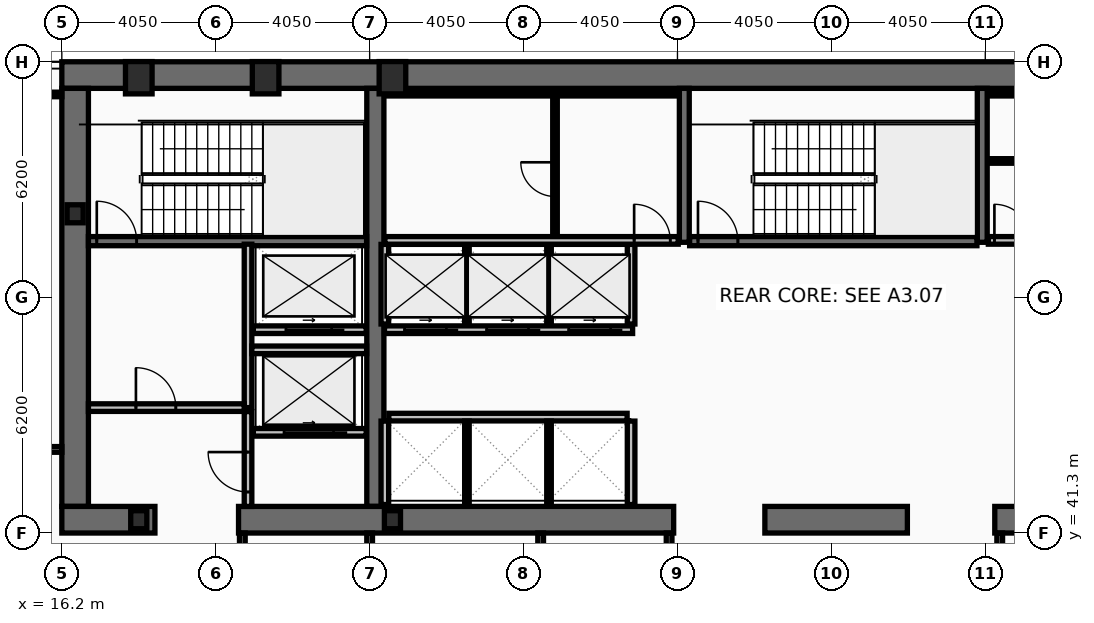
"""IFC4 building model, lengths in metres.
Left out: names, types, materials, properties, quantities, classifications, styles, units other than length and angle.
Written with IfcOpenShell. Run it as: python <this file> out.ifc"""

import sys

from ifc_helpers import new_model, si_unit, direction, frame, frame_2d, origin, origin_2d, place, context, subcontext, project, spatial, rectangle, hollow_rectangle, i_section, extrude, element, fill, save


model = new_model("IFC4")
c1 = context("Model", 3, precision=1e-05, world=origin(), true_north=direction((0.0, 1.0)))
c2 = subcontext(c1, "Body", "Model", "MODEL_VIEW")
j1 = project(units=[si_unit("LENGTHUNIT", "METRE"), si_unit("PLANEANGLEUNIT", "RADIAN")], contexts=[c1])
p1 = place(None, origin())
s1 = spatial("IfcSite", under=j1, at=p1, CompositionType="ELEMENT")
p2 = place(p1, origin())
s2 = spatial("IfcBuilding", under=s1, at=p2, CompositionType="ELEMENT")
p3 = place(p2, frame((0.0, 0.0, 94.6)))
s3 = spatial("IfcBuildingStorey", under=s2, at=p3, CompositionType="ELEMENT", Elevation=94.6)
p4 = place(p3, frame((16.2, 53.35, 0.0), z_axis=(0.0, 0.0, 1.0), x_axis=(1.0, 0.0, 0.0)))
e1 = element("IfcWall", 1, at=p4, inside=s3, PredefinedType="SHEAR", context=c2, shape_type="SweptSolid", body=[
    extrude(rectangle(XDim=40.5, YDim=0.7, at=frame_2d((20.25, 0.0))), origin(), (0.0, 0.0, 1.0), 3.82),
])
p5 = place(p3, frame((16.55, 42.0, 0.0), z_axis=(0.0, 0.0, 1.0), x_axis=(0.0, 1.0, 0.0)))
e2 = element("IfcWall", 2, at=p5, inside=s3, PredefinedType="SHEAR", context=c2, shape_type="SweptSolid", body=[
    extrude(rectangle(XDim=11.0, YDim=0.7, at=frame_2d((5.5, 0.0))), origin(), (0.0, 0.0, 1.0), 3.82),
])
p6 = place(p3, frame((24.45, 42.0, 0.0), z_axis=(0.0, 0.0, 1.0), x_axis=(0.0, 1.0, 0.0)))
e3 = element("IfcWall", 3, at=p6, inside=s3, PredefinedType="SHEAR", context=c2, shape_type="SweptSolid", body=[
    extrude(rectangle(XDim=11.0, YDim=0.45, at=frame_2d((5.5, 0.0))), origin(), (0.0, 0.0, 1.0), 3.82),
])
p7 = place(p3, frame((18.65, 41.65, 0.0), z_axis=(0.0, 0.0, 1.0), x_axis=(-1.0, 0.0, 0.0)))
e4 = element("IfcWall", 4, at=p7, inside=s3, PredefinedType="SHEAR", context=c2, shape_type="SweptSolid", body=[
    extrude(rectangle(XDim=2.45, YDim=0.7, at=frame_2d((1.225, 0.0))), origin(), (0.0, 0.0, 1.0), 3.82),
])
p8 = place(p3, frame((32.3, 41.65, 0.0), z_axis=(0.0, 0.0, 1.0), x_axis=(-1.0, 0.0, 0.0)))
e5 = element("IfcWall", 5, at=p8, inside=s3, PredefinedType="SHEAR", context=c2, shape_type="SweptSolid", body=[
    extrude(rectangle(XDim=11.45, YDim=0.7, at=frame_2d((5.725, 0.0))), origin(), (0.0, 0.0, 1.0), 3.82),
])
p9 = place(p3, frame((38.45, 41.65, 0.0), z_axis=(0.0, 0.0, 1.0), x_axis=(-1.0, 0.0, 0.0)))
e6 = element("IfcWall", 6, at=p9, inside=s3, PredefinedType="SHEAR", context=c2, shape_type="SweptSolid", body=[
    extrude(rectangle(XDim=3.75, YDim=0.7, at=frame_2d((1.875, 0.0))), origin(), (0.0, 0.0, 1.0), 3.82),
])
p10 = place(p3, frame((52.05, 41.65, 0.0), z_axis=(0.0, 0.0, 1.0), x_axis=(-1.0, 0.0, 0.0)))
e7 = element("IfcWall", 7, at=p10, inside=s3, PredefinedType="SHEAR", context=c2, shape_type="SweptSolid", body=[
    extrude(rectangle(XDim=11.3, YDim=0.7, at=frame_2d((5.65, 0.0))), origin(), (0.0, 0.0, 1.0), 3.82),
])
for number, where, z_axis, x_axis in (
    (8, (32.58, 48.95, 0.0), (0.0, 0.0, 1.0), (0.0, 1.0, 0.0)),
    (9, (40.42, 48.95, 0.0), (0.0, 0.0, 1.0), (0.0, 1.0, 0.0)),
):
    element("IfcWall", number, at=place(p3, frame(where, z_axis=z_axis, x_axis=x_axis)), inside=s3, PredefinedType="SHEAR", context=c2, shape_type="SweptSolid", body=[
        extrude(rectangle(XDim=4.05, YDim=0.26, at=frame_2d((2.025, 0.0))), origin(), (0.0, 0.0, 1.0), 3.82),
    ])
p11 = place(p3, frame((16.9, 48.98, 0.0), z_axis=(0.0, 0.0, 1.0), x_axis=(1.0, 0.0, 0.0)))
e10 = element("IfcWall", 10, at=p11, inside=s3, PredefinedType="SHEAR", context=c2, shape_type="SweptSolid", body=[
    extrude(rectangle(XDim=7.32, YDim=0.24, at=frame_2d((3.66, 0.0))), origin(), (0.0, 0.0, 1.0), 3.82),
])
p12 = place(p11, frame((0.22, 0.0, 0.0)))
e11 = element("IfcOpeningElement", 11, at=p12, cuts=e10, PredefinedType="OPENING", context=c2, shape_type="SweptSolid", body=[
    extrude(rectangle(XDim=1.05, YDim=2.15, at=frame_2d((0.525, 1.075))), frame((0.0, 0.13, 0.0), z_axis=(0.0, -1.0, 0.0), x_axis=(1.0, 0.0, 0.0)), (0.0, 0.0, 1.0), 0.26),
])
p13 = place(p3, frame((32.72, 48.98, 0.0), z_axis=(0.0, 0.0, 1.0), x_axis=(1.0, 0.0, 0.0)))
e12 = element("IfcWall", 12, at=p13, inside=s3, PredefinedType="SHEAR", context=c2, shape_type="SweptSolid", body=[
    extrude(rectangle(XDim=7.56, YDim=0.24, at=frame_2d((3.78, 0.0))), origin(), (0.0, 0.0, 1.0), 3.82),
])
p14 = place(p13, frame((0.22, 0.0, 0.0)))
e13 = element("IfcOpeningElement", 13, at=p14, cuts=e12, PredefinedType="OPENING", context=c2, shape_type="SweptSolid", body=[
    extrude(rectangle(XDim=1.05, YDim=2.15, at=frame_2d((0.525, 1.075))), frame((0.0, 0.13, 0.0), z_axis=(0.0, -1.0, 0.0), x_axis=(1.0, 0.0, 0.0)), (0.0, 0.0, 1.0), 0.26),
])
for number, where, z_axis, x_axis in (
    (14, (18.225, 53.28, 0.0), (0.0, 0.0, 1.0), (1.0, 0.0, 0.0)),
    (15, (21.562, 53.28, 0.0), (0.0, 0.0, 1.0), (1.0, 0.0, 0.0)),
    (16, (24.9, 53.28, 0.0), (0.0, 0.0, 1.0), (1.0, 0.0, 0.0)),
):
    element("IfcColumn", number, at=place(p3, frame(where, z_axis=z_axis, x_axis=x_axis)), inside=s3, PredefinedType="COLUMN", context=c2, shape_type="SweptSolid", body=[
        extrude(hollow_rectangle(XDim=0.7, YDim=0.85, WallThickness=0.05, at=origin_2d()), origin(), (0.0, 0.0, 1.0), 4.0),
    ])
for number, where, z_axis, x_axis in (
    (17, (16.55, 49.7, 0.0), (0.0, 0.0, 1.0), (1.0, 0.0, 0.0)),
    (18, (18.225, 41.65, 0.0), (0.0, 0.0, 1.0), (1.0, 0.0, 0.0)),
    (19, (24.9, 41.65, 0.0), (0.0, 0.0, 1.0), (1.0, 0.0, 0.0)),
):
    element("IfcColumn", number, at=place(p3, frame(where, z_axis=z_axis, x_axis=x_axis)), inside=s3, PredefinedType="COLUMN", context=c2, shape_type="SweptSolid", body=[
        extrude(i_section(OverallWidth=0.424, OverallDepth=0.474, WebThickness=0.048, FlangeThickness=0.077, at=origin_2d()), origin(), (0.0, 0.0, 1.0), 4.0),
    ])
p15 = place(p3, frame((24.21, 43.95, 0.0), z_axis=(0.0, 0.0, 1.0), x_axis=(-1.0, 0.0, 0.0)))
e20 = element("IfcWall", 20, at=p15, inside=s3, PredefinedType="PARTITIONING", context=c2, shape_type="SweptSolid", body=[
    extrude(rectangle(XDim=2.97, YDim=0.2, at=frame_2d((1.485, 0.0))), origin(), (0.0, 0.0, 1.0), 3.82),
])
p16 = place(p15, frame((0.86, 0.0, 0.0)))
e21 = element("IfcOpeningElement", 21, at=p16, cuts=e20, PredefinedType="OPENING", context=c2, shape_type="SweptSolid", body=[
    extrude(rectangle(XDim=1.3, YDim=2.18, at=frame_2d((0.65, 1.09))), frame((0.0, 0.11, 0.0), z_axis=(0.0, -1.0, 0.0), x_axis=(1.0, 0.0, 0.0)), (0.0, 0.0, 1.0), 0.22),
])
p17 = place(p3, frame((24.21, 46.65, 0.0), z_axis=(0.0, 0.0, 1.0), x_axis=(-1.0, 0.0, 0.0)))
e22 = element("IfcWall", 22, at=p17, inside=s3, PredefinedType="PARTITIONING", context=c2, shape_type="SweptSolid", body=[
    extrude(rectangle(XDim=2.97, YDim=0.2, at=frame_2d((1.485, 0.0))), origin(), (0.0, 0.0, 1.0), 3.82),
])
p18 = place(p17, frame((0.91, 0.0, 0.0)))
e23 = element("IfcOpeningElement", 23, at=p18, cuts=e22, PredefinedType="OPENING", context=c2, shape_type="SweptSolid", body=[
    extrude(rectangle(XDim=1.2, YDim=2.18, at=frame_2d((0.6, 1.09))), frame((0.0, 0.11, 0.0), z_axis=(0.0, -1.0, 0.0), x_axis=(1.0, 0.0, 0.0)), (0.0, 0.0, 1.0), 0.22),
])
p19 = place(p3, frame((31.22, 46.65, 0.0), z_axis=(0.0, 0.0, 1.0), x_axis=(-1.0, 0.0, 0.0)))
e24 = element("IfcWall", 24, at=p19, inside=s3, PredefinedType="PARTITIONING", context=c2, shape_type="SweptSolid", body=[
    extrude(rectangle(XDim=6.53, YDim=0.2, at=frame_2d((3.265, 0.0))), origin(), (0.0, 0.0, 1.0), 3.82),
])
p20 = place(p19, frame((4.9, 0.0, 0.0)))
e25 = element("IfcOpeningElement", 25, at=p20, cuts=e24, PredefinedType="OPENING", context=c2, shape_type="SweptSolid", body=[
    extrude(rectangle(XDim=1.1, YDim=2.18, at=frame_2d((0.55, 1.09))), frame((0.0, 0.11, 0.0), z_axis=(0.0, -1.0, 0.0), x_axis=(1.0, 0.0, 0.0)), (0.0, 0.0, 1.0), 0.22),
])
p21 = place(p19, frame((2.74, 0.0, 0.0)))
e26 = element("IfcOpeningElement", 26, at=p21, cuts=e24, PredefinedType="OPENING", context=c2, shape_type="SweptSolid", body=[
    extrude(rectangle(XDim=1.1, YDim=2.18, at=frame_2d((0.55, 1.09))), frame((0.0, 0.11, 0.0), z_axis=(0.0, -1.0, 0.0), x_axis=(1.0, 0.0, 0.0)), (0.0, 0.0, 1.0), 0.22),
])
p22 = place(p19, frame((0.58, 0.0, 0.0)))
e27 = element("IfcOpeningElement", 27, at=p22, cuts=e24, PredefinedType="OPENING", context=c2, shape_type="SweptSolid", body=[
    extrude(rectangle(XDim=1.1, YDim=2.18, at=frame_2d((0.55, 1.09))), frame((0.0, 0.11, 0.0), z_axis=(0.0, -1.0, 0.0), x_axis=(1.0, 0.0, 0.0)), (0.0, 0.0, 1.0), 0.22),
])
p23 = place(p3, frame((21.1, 44.6, 0.0), z_axis=(0.0, 0.0, 1.0), x_axis=(0.0, 1.0, 0.0)))
e28 = element("IfcWall", 28, at=p23, inside=s3, PredefinedType="PARTITIONING", context=c2, shape_type="SweptSolid", body=[
    extrude(rectangle(XDim=4.3, YDim=0.2, at=frame_2d((2.15, 0.0))), origin(), (0.0, 0.0, 1.0), 3.82),
])
p24 = place(p3, frame((16.9, 44.6, 0.0), z_axis=(0.0, 0.0, 1.0), x_axis=(1.0, 0.0, 0.0)))
e29 = element("IfcWall", 29, at=p24, inside=s3, PredefinedType="PARTITIONING", context=c2, shape_type="SweptSolid", body=[
    extrude(rectangle(XDim=4.1, YDim=0.2, at=frame_2d((2.05, 0.0))), origin(), (0.0, 0.0, 1.0), 3.82),
])
p25 = place(p24, frame((1.25, 0.0, 0.0)))
e30 = element("IfcOpeningElement", 30, at=p25, cuts=e29, PredefinedType="OPENING", context=c2, shape_type="SweptSolid", body=[
    extrude(rectangle(XDim=1.05, YDim=2.15, at=frame_2d((0.525, 1.075))), frame((0.0, 0.11, 0.0), z_axis=(0.0, -1.0, 0.0), x_axis=(1.0, 0.0, 0.0)), (0.0, 0.0, 1.0), 0.22),
])
p26 = place(p3, frame((21.2, 46.12, 0.0), z_axis=(0.0, 0.0, 1.0), x_axis=(1.0, 0.0, 0.0)))
e31 = element("IfcWall", 31, at=p26, inside=s3, PredefinedType="PARTITIONING", context=c2, shape_type="SweptSolid", body=[
    extrude(rectangle(XDim=3.02, YDim=0.2, at=frame_2d((1.51, 0.0))), origin(), (0.0, 0.0, 1.0), 3.82),
])
p27 = place(p3, frame((21.1, 42.0, 0.0), z_axis=(0.0, 0.0, 1.0), x_axis=(0.0, 1.0, 0.0)))
e32 = element("IfcWall", 32, at=p27, inside=s3, PredefinedType="PARTITIONING", context=c2, shape_type="SweptSolid", body=[
    extrude(rectangle(XDim=2.495, YDim=0.2, at=frame_2d((1.248, 0.0))), origin(), (0.0, 0.0, 1.0), 3.82),
])
p28 = place(p27, frame((0.38, 0.0, 0.0)))
e33 = element("IfcOpeningElement", 33, at=p28, cuts=e32, PredefinedType="OPENING", context=c2, shape_type="SweptSolid", body=[
    extrude(rectangle(XDim=1.05, YDim=2.15, at=frame_2d((0.525, 1.075))), frame((0.0, 0.11, 0.0), z_axis=(0.0, -1.0, 0.0), x_axis=(1.0, 0.0, 0.0)), (0.0, 0.0, 1.0), 0.22),
])
for number, where, z_axis, x_axis in (
    (34, (24.7, 46.8, 0.0), (0.0, 0.0, 1.0), (0.0, 1.0, 0.0)),
    (35, (31.18, 46.8, 0.0), (0.0, 0.0, 1.0), (0.0, 1.0, 0.0)),
):
    element("IfcWall", number, at=place(p3, frame(where, z_axis=z_axis, x_axis=x_axis)), inside=s3, PredefinedType="PARTITIONING", context=c2, shape_type="SweptSolid", body=[
        extrude(rectangle(XDim=2.095, YDim=0.2, at=frame_2d((1.047, 0.0))), origin(), (0.0, 0.0, 1.0), 3.82),
    ])
for number, where, z_axis, x_axis in (
    (36, (26.86, 46.8, 0.0), (0.0, 0.0, 1.0), (0.0, 1.0, 0.0)),
    (37, (29.02, 46.8, 0.0), (0.0, 0.0, 1.0), (0.0, 1.0, 0.0)),
):
    element("IfcWall", number, at=place(p3, frame(where, z_axis=z_axis, x_axis=x_axis)), inside=s3, PredefinedType="PARTITIONING", context=c2, shape_type="SweptSolid", body=[
        extrude(rectangle(XDim=2.095, YDim=0.12, at=frame_2d((1.047, 0.0))), origin(), (0.0, 0.0, 1.0), 3.82),
    ])
p29 = place(p3, frame((24.805, 44.35, 0.0), z_axis=(0.0, 0.0, 1.0), x_axis=(1.0, 0.0, 0.0)))
e38 = element("IfcWall", 38, at=p29, inside=s3, PredefinedType="PARTITIONING", context=c2, shape_type="SweptSolid", body=[
    extrude(rectangle(XDim=6.27, YDim=0.2, at=frame_2d((3.135, 0.0))), origin(), (0.0, 0.0, 1.0), 3.82),
])
for number, where, z_axis, x_axis in (
    (39, (24.7, 42.05, 0.0), (0.0, 0.0, 1.0), (0.0, 1.0, 0.0)),
    (40, (31.18, 42.05, 0.0), (0.0, 0.0, 1.0), (0.0, 1.0, 0.0)),
):
    element("IfcWall", number, at=place(p3, frame(where, z_axis=z_axis, x_axis=x_axis)), inside=s3, PredefinedType="PARTITIONING", context=c2, shape_type="SweptSolid", body=[
        extrude(rectangle(XDim=2.195, YDim=0.2, at=frame_2d((1.098, 0.0))), origin(), (0.0, 0.0, 1.0), 3.82),
    ])
for number, where, z_axis, x_axis in (
    (41, (26.86, 42.05, 0.0), (0.0, 0.0, 1.0), (0.0, 1.0, 0.0)),
    (42, (29.02, 42.05, 0.0), (0.0, 0.0, 1.0), (0.0, 1.0, 0.0)),
):
    element("IfcWall", number, at=place(p3, frame(where, z_axis=z_axis, x_axis=x_axis)), inside=s3, PredefinedType="PARTITIONING", context=c2, shape_type="SweptSolid", body=[
        extrude(rectangle(XDim=2.195, YDim=0.12, at=frame_2d((1.098, 0.0))), origin(), (0.0, 0.0, 1.0), 3.82),
    ])
p30 = place(p3, frame((24.7, 52.86, 0.0), z_axis=(0.0, 0.0, 1.0), x_axis=(1.0, 0.0, 0.0)))
e43 = element("IfcWall", 43, at=p30, inside=s3, PredefinedType="PARTITIONING", context=c2, shape_type="SweptSolid", body=[
    extrude(rectangle(XDim=7.72, YDim=0.12, at=frame_2d((3.86, 0.0))), origin(), (0.0, 0.0, 1.0), 3.82),
])
p31 = place(p3, frame((24.7, 49.0, 0.0), z_axis=(0.0, 0.0, 1.0), x_axis=(1.0, 0.0, 0.0)))
e44 = element("IfcWall", 44, at=p31, inside=s3, PredefinedType="PARTITIONING", context=c2, shape_type="SweptSolid", body=[
    extrude(rectangle(XDim=7.72, YDim=0.2, at=frame_2d((3.86, 0.0))), origin(), (0.0, 0.0, 1.0), 3.82),
])
p32 = place(p31, frame((6.56, 0.0, 0.0)))
e45 = element("IfcOpeningElement", 45, at=p32, cuts=e44, PredefinedType="OPENING", context=c2, shape_type="SweptSolid", body=[
    extrude(rectangle(XDim=0.95, YDim=2.1, at=frame_2d((0.475, 1.05))), frame((0.0, 0.11, 0.0), z_axis=(0.0, -1.0, 0.0), x_axis=(1.0, 0.0, 0.0)), (0.0, 0.0, 1.0), 0.22),
])
p33 = place(p3, frame((29.177, 49.105, 0.0), z_axis=(0.0, 0.0, 1.0), x_axis=(0.0, 1.0, 0.0)))
e46 = element("IfcWall", 46, at=p33, inside=s3, PredefinedType="PARTITIONING", context=c2, shape_type="SweptSolid", body=[
    extrude(rectangle(XDim=3.69, YDim=0.12, at=frame_2d((1.845, 0.0))), origin(), (0.0, 0.0, 1.0), 3.82),
])
p34 = place(p33, frame((1.05, 0.0, 0.0)))
e47 = element("IfcOpeningElement", 47, at=p34, cuts=e46, PredefinedType="OPENING", context=c2, shape_type="SweptSolid", body=[
    extrude(rectangle(XDim=0.9, YDim=2.05, at=frame_2d((0.45, 1.025))), frame((0.0, 0.07, 0.0), z_axis=(0.0, -1.0, 0.0), x_axis=(1.0, 0.0, 0.0)), (0.0, 0.0, 1.0), 0.14),
])
p35 = place(p3, frame((40.58, 52.86, 0.0), z_axis=(0.0, 0.0, 1.0), x_axis=(1.0, 0.0, 0.0)))
e48 = element("IfcWall", 48, at=p35, inside=s3, PredefinedType="PARTITIONING", context=c2, shape_type="SweptSolid", body=[
    extrude(rectangle(XDim=7.56, YDim=0.12, at=frame_2d((3.78, 0.0))), origin(), (0.0, 0.0, 1.0), 3.82),
])
p36 = place(p3, frame((40.58, 49.0, 0.0), z_axis=(0.0, 0.0, 1.0), x_axis=(1.0, 0.0, 0.0)))
e49 = element("IfcWall", 49, at=p36, inside=s3, PredefinedType="PARTITIONING", context=c2, shape_type="SweptSolid", body=[
    extrude(rectangle(XDim=7.56, YDim=0.2, at=frame_2d((3.78, 0.0))), origin(), (0.0, 0.0, 1.0), 3.82),
])
p37 = place(p36, frame((0.16, 0.0, 0.0)))
e50 = element("IfcOpeningElement", 50, at=p37, cuts=e49, PredefinedType="OPENING", context=c2, shape_type="SweptSolid", body=[
    extrude(rectangle(XDim=0.95, YDim=2.1, at=frame_2d((0.475, 1.05))), frame((0.0, 0.11, 0.0), z_axis=(0.0, -1.0, 0.0), x_axis=(1.0, 0.0, 0.0)), (0.0, 0.0, 1.0), 0.22),
])
p38 = place(p3, frame((40.63, 51.09, 0.0), z_axis=(0.0, 0.0, 1.0), x_axis=(1.0, 0.0, 0.0)))
e51 = element("IfcWall", 51, at=p38, inside=s3, PredefinedType="PARTITIONING", context=c2, shape_type="SweptSolid", body=[
    extrude(rectangle(XDim=7.46, YDim=0.12, at=frame_2d((3.73, 0.0))), origin(), (0.0, 0.0, 1.0), 3.82),
])
p39 = place(p38, frame((2.4, 0.0, 0.0)))
e52 = element("IfcOpeningElement", 52, at=p39, cuts=e51, PredefinedType="OPENING", context=c2, shape_type="SweptSolid", body=[
    extrude(rectangle(XDim=0.9, YDim=2.05, at=frame_2d((0.45, 1.025))), frame((0.0, 0.07, 0.0), z_axis=(0.0, -1.0, 0.0), x_axis=(1.0, 0.0, 0.0)), (0.0, 0.0, 1.0), 0.14),
])
for number, where, z_axis, x_axis in (
    (53, (20.95, 38.28, 0.0), (0.0, 0.0, 1.0), (0.0, 1.0, 0.0)),
    (54, (24.3, 38.28, 0.0), (0.0, 0.0, 1.0), (0.0, 1.0, 0.0)),
    (55, (28.8, 38.28, 0.0), (0.0, 0.0, 1.0), (0.0, 1.0, 0.0)),
    (56, (32.18, 38.28, 0.0), (0.0, 0.0, 1.0), (0.0, 1.0, 0.0)),
    (57, (40.88, 38.28, 0.0), (0.0, 0.0, 1.0), (0.0, 1.0, 0.0)),
):
    element("IfcWall", number, at=place(p3, frame(where, z_axis=z_axis, x_axis=x_axis)), inside=s3, PredefinedType="PARTITIONING", context=c2, shape_type="SweptSolid", body=[
        extrude(rectangle(XDim=3.02, YDim=0.15, at=frame_2d((1.51, 0.0))), origin(), (0.0, 0.0, 1.0), 3.82),
    ])
p40 = place(p3, frame((4.095, 43.5, 0.0), z_axis=(0.0, 0.0, 1.0), x_axis=(1.0, 0.0, 0.0)))
e58 = element("IfcWall", 58, at=p40, inside=s3, PredefinedType="PARTITIONING", context=c2, shape_type="SweptSolid", body=[
    extrude(rectangle(XDim=12.105, YDim=0.15, at=frame_2d((6.052, 0.0))), origin(), (0.0, 0.0, 1.0), 3.01),
])
p41 = place(p40, frame((10.32, 0.0, 0.0)))
e59 = element("IfcOpeningElement", 59, at=p41, cuts=e58, PredefinedType="OPENING", context=c2, shape_type="SweptSolid", body=[
    extrude(rectangle(XDim=0.9, YDim=2.05, at=frame_2d((0.45, 1.025))), frame((0.0, 0.085, 0.0), z_axis=(0.0, -1.0, 0.0), x_axis=(1.0, 0.0, 0.0)), (0.0, 0.0, 1.0), 0.17),
])
p42 = place(p3, frame((4.095, 52.84, 0.0), z_axis=(0.0, 0.0, 1.0), x_axis=(1.0, 0.0, 0.0)))
e60 = element("IfcWall", 60, at=p42, inside=s3, PredefinedType="PARTITIONING", context=c2, shape_type="SweptSolid", body=[
    extrude(rectangle(XDim=12.105, YDim=0.12, at=frame_2d((6.052, 0.0))), origin(), (0.0, 0.0, 1.0), 3.82),
])
p43 = place(p12, origin())
e61 = element("IfcDoor", 61, at=p43, inside=s3, OperationType="SINGLE_SWING_LEFT", PredefinedType="DOOR", context=c2, shape_type="SweptSolid", body=[
    extrude(rectangle(XDim=1.05, YDim=2.15, at=frame_2d((0.525, 1.075))), frame((0.0, 0.025, 0.0), z_axis=(0.0, -1.0, 0.0), x_axis=(1.0, 0.0, 0.0)), (0.0, 0.0, 1.0), 0.05),
])
fill(e11, e61)
p44 = place(p14, origin())
e62 = element("IfcDoor", 62, at=p44, inside=s3, OperationType="SINGLE_SWING_LEFT", PredefinedType="DOOR", context=c2, shape_type="SweptSolid", body=[
    extrude(rectangle(XDim=1.05, YDim=2.15, at=frame_2d((0.525, 1.075))), frame((0.0, 0.025, 0.0), z_axis=(0.0, -1.0, 0.0), x_axis=(1.0, 0.0, 0.0)), (0.0, 0.0, 1.0), 0.05),
])
fill(e13, e62)
p45 = place(p16, origin())
e63 = element("IfcDoor", 63, at=p45, inside=s3, OperationType="SLIDING_TO_LEFT", PredefinedType="DOOR", context=c2, shape_type="SweptSolid", body=[
    extrude(rectangle(XDim=1.3, YDim=2.18, at=frame_2d((0.65, 1.09))), frame((0.0, 0.025, 0.0), z_axis=(0.0, -1.0, 0.0), x_axis=(1.0, 0.0, 0.0)), (0.0, 0.0, 1.0), 0.05),
])
fill(e21, e63)
p46 = place(p18, origin())
e64 = element("IfcDoor", 64, at=p46, inside=s3, OperationType="SLIDING_TO_LEFT", PredefinedType="DOOR", context=c2, shape_type="SweptSolid", body=[
    extrude(rectangle(XDim=1.2, YDim=2.18, at=frame_2d((0.6, 1.09))), frame((0.0, 0.025, 0.0), z_axis=(0.0, -1.0, 0.0), x_axis=(1.0, 0.0, 0.0)), (0.0, 0.0, 1.0), 0.05),
])
fill(e23, e64)
p47 = place(p20, origin())
e65 = element("IfcDoor", 65, at=p47, inside=s3, OperationType="SLIDING_TO_LEFT", PredefinedType="DOOR", context=c2, shape_type="SweptSolid", body=[
    extrude(rectangle(XDim=1.1, YDim=2.18, at=frame_2d((0.55, 1.09))), frame((0.0, 0.025, 0.0), z_axis=(0.0, -1.0, 0.0), x_axis=(1.0, 0.0, 0.0)), (0.0, 0.0, 1.0), 0.05),
])
fill(e25, e65)
p48 = place(p21, origin())
e66 = element("IfcDoor", 66, at=p48, inside=s3, OperationType="SLIDING_TO_LEFT", PredefinedType="DOOR", context=c2, shape_type="SweptSolid", body=[
    extrude(rectangle(XDim=1.1, YDim=2.18, at=frame_2d((0.55, 1.09))), frame((0.0, 0.025, 0.0), z_axis=(0.0, -1.0, 0.0), x_axis=(1.0, 0.0, 0.0)), (0.0, 0.0, 1.0), 0.05),
])
fill(e26, e66)
p49 = place(p22, origin())
e67 = element("IfcDoor", 67, at=p49, inside=s3, OperationType="SLIDING_TO_LEFT", PredefinedType="DOOR", context=c2, shape_type="SweptSolid", body=[
    extrude(rectangle(XDim=1.1, YDim=2.18, at=frame_2d((0.55, 1.09))), frame((0.0, 0.025, 0.0), z_axis=(0.0, -1.0, 0.0), x_axis=(1.0, 0.0, 0.0)), (0.0, 0.0, 1.0), 0.05),
])
fill(e27, e67)
p50 = place(p25, origin())
e68 = element("IfcDoor", 68, at=p50, inside=s3, OperationType="SINGLE_SWING_LEFT", PredefinedType="DOOR", context=c2, shape_type="SweptSolid", body=[
    extrude(rectangle(XDim=1.05, YDim=2.15, at=frame_2d((0.525, 1.075))), frame((0.0, 0.025, 0.0), z_axis=(0.0, -1.0, 0.0), x_axis=(1.0, 0.0, 0.0)), (0.0, 0.0, 1.0), 0.05),
])
fill(e30, e68)
p51 = place(p28, origin())
e69 = element("IfcDoor", 69, at=p51, inside=s3, OperationType="SINGLE_SWING_RIGHT", PredefinedType="DOOR", context=c2, shape_type="SweptSolid", body=[
    extrude(rectangle(XDim=1.05, YDim=2.15, at=frame_2d((0.525, 1.075))), frame((0.0, 0.025, 0.0), z_axis=(0.0, -1.0, 0.0), x_axis=(1.0, 0.0, 0.0)), (0.0, 0.0, 1.0), 0.05),
])
fill(e33, e69)
p52 = place(p32, origin())
e70 = element("IfcDoor", 70, at=p52, inside=s3, OperationType="SINGLE_SWING_LEFT", PredefinedType="DOOR", context=c2, shape_type="SweptSolid", body=[
    extrude(rectangle(XDim=0.95, YDim=2.1, at=frame_2d((0.475, 1.05))), frame((0.0, 0.025, 0.0), z_axis=(0.0, -1.0, 0.0), x_axis=(1.0, 0.0, 0.0)), (0.0, 0.0, 1.0), 0.05),
])
fill(e45, e70)
p53 = place(p34, origin())
e71 = element("IfcDoor", 71, at=p53, inside=s3, OperationType="SINGLE_SWING_RIGHT", PredefinedType="DOOR", context=c2, shape_type="SweptSolid", body=[
    extrude(rectangle(XDim=0.9, YDim=2.05, at=frame_2d((0.45, 1.025))), frame((0.0, 0.025, 0.0), z_axis=(0.0, -1.0, 0.0), x_axis=(1.0, 0.0, 0.0)), (0.0, 0.0, 1.0), 0.05),
])
fill(e47, e71)
p54 = place(p37, origin())
e72 = element("IfcDoor", 72, at=p54, inside=s3, OperationType="SINGLE_SWING_LEFT", PredefinedType="DOOR", context=c2, shape_type="SweptSolid", body=[
    extrude(rectangle(XDim=0.95, YDim=2.1, at=frame_2d((0.475, 1.05))), frame((0.0, 0.025, 0.0), z_axis=(0.0, -1.0, 0.0), x_axis=(1.0, 0.0, 0.0)), (0.0, 0.0, 1.0), 0.05),
])
fill(e50, e72)
save(model, sys.argv[1])
